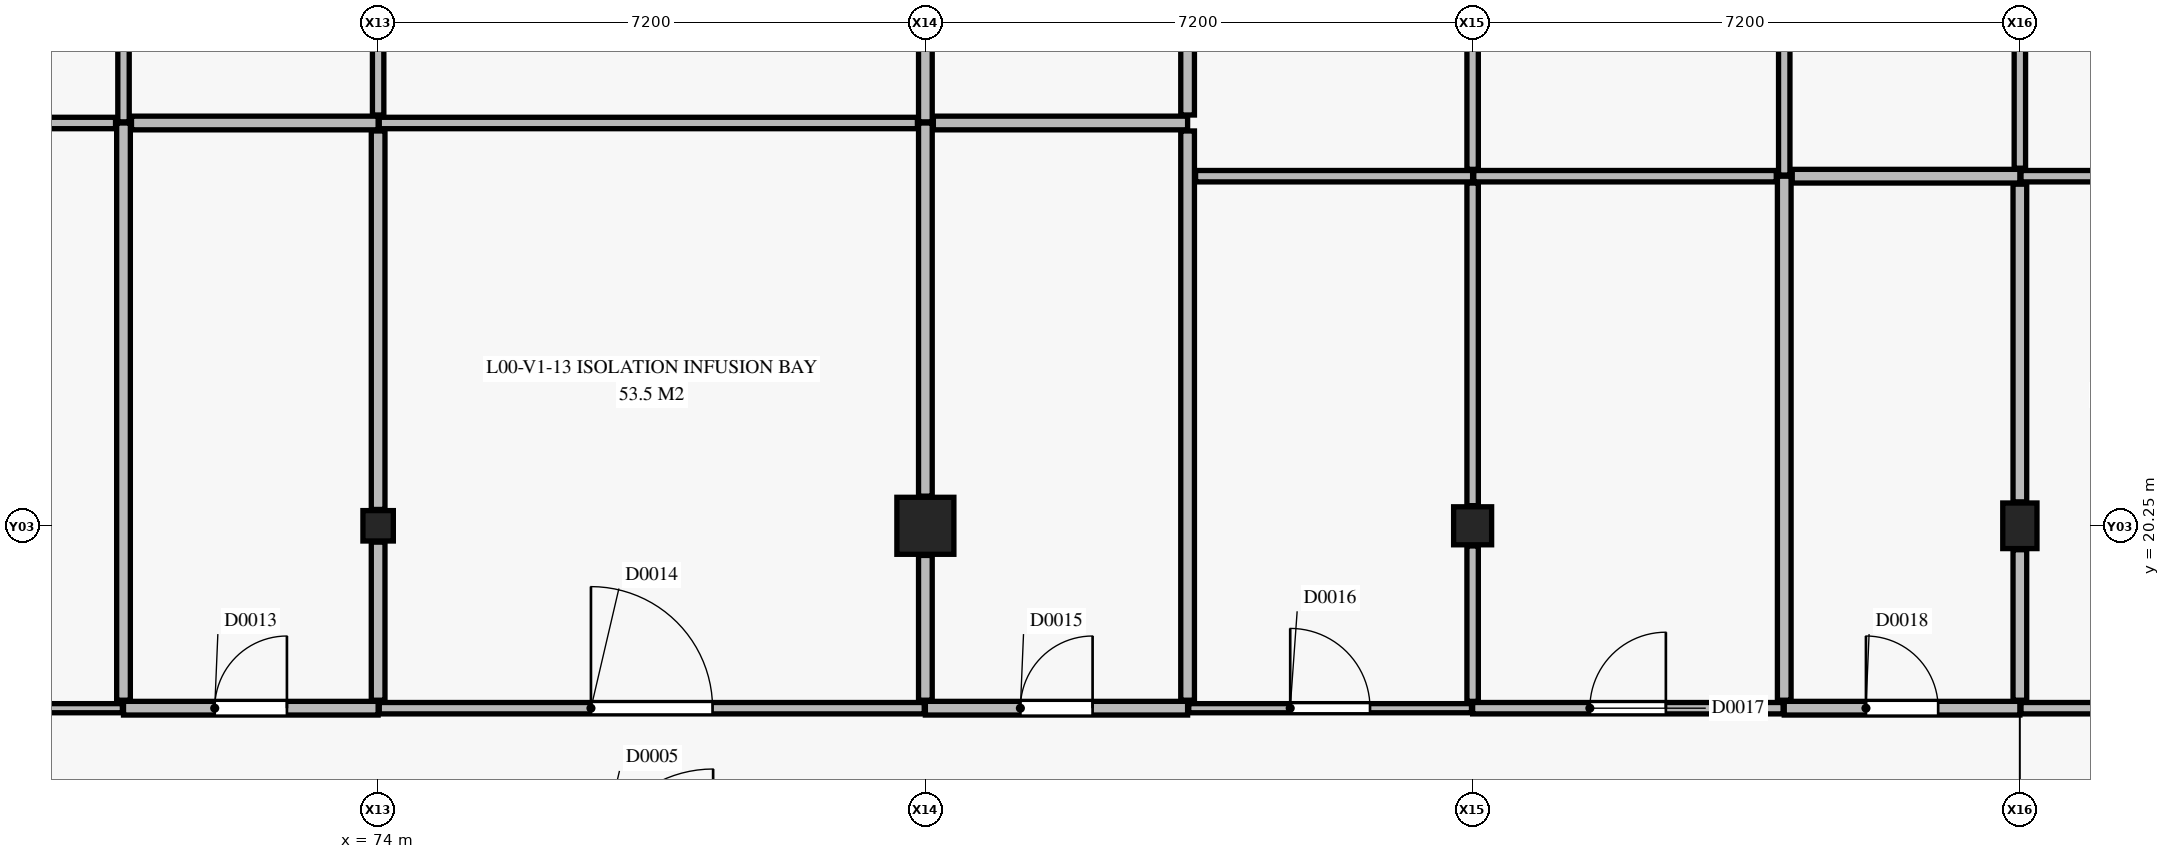
"""IFC4 building model, lengths in metres.
Left out: names, types, materials, properties, quantities, classifications, styles, units other than length and angle.
Written with IfcOpenShell. Run it as: python <this file> out.ifc"""

import sys

from ifc_helpers import new_model, si_unit, direction, frame, frame_2d, origin, origin_2d, place, context, subcontext, project, spatial, rectangle, extrude, element, fill, save


model = new_model("IFC4")
c1 = context("Model", 3, precision=1e-05, world=origin(), true_north=direction((0.0, 1.0)))
c2 = subcontext(c1, "Body", "Model", "MODEL_VIEW")
j1 = project(units=[si_unit("LENGTHUNIT", "METRE"), si_unit("PLANEANGLEUNIT", "RADIAN")], contexts=[c1])
p1 = place(None, origin())
s1 = spatial("IfcSite", under=j1, at=p1, CompositionType="ELEMENT")
p2 = place(p1, origin())
s2 = spatial("IfcBuilding", under=s1, at=p2, CompositionType="ELEMENT")
p3 = place(p2, origin())
s3 = spatial("IfcBuildingStorey", under=s2, at=p3, CompositionType="ELEMENT", Elevation=0.0)
p4 = place(p3, frame((74.0, 20.25, 0.0), z_axis=(0.0, 0.0, 1.0), x_axis=(1.0, 0.0, 0.0)))
e1 = element("IfcColumn", 1, at=p4, inside=s3, PredefinedType="COLUMN", context=c2, shape_type="SweptSolid", body=[
    extrude(rectangle(XDim=0.4, YDim=0.4, at=origin_2d()), origin(), (0.0, 0.0, 1.0), 4.8),
])
p5 = place(p3, frame((81.2, 20.25, 0.0), z_axis=(0.0, 0.0, 1.0), x_axis=(1.0, 0.0, 0.0)))
e2 = element("IfcColumn", 2, at=p5, inside=s3, PredefinedType="COLUMN", context=c2, shape_type="SweptSolid", body=[
    extrude(rectangle(XDim=0.75, YDim=0.75, at=origin_2d()), origin(), (0.0, 0.0, 1.0), 4.8),
])
p6 = place(p3, frame((88.4, 20.25, 0.0), z_axis=(0.0, 0.0, 1.0), x_axis=(1.0, 0.0, 0.0)))
e3 = element("IfcColumn", 3, at=p6, inside=s3, PredefinedType="COLUMN", context=c2, shape_type="SweptSolid", body=[
    extrude(rectangle(XDim=0.5, YDim=0.5, at=origin_2d()), origin(), (0.0, 0.0, 1.0), 4.8),
])
p7 = place(p3, frame((95.6, 20.25, 0.0), z_axis=(0.0, 0.0, 1.0), x_axis=(1.0, 0.0, 0.0)))
e4 = element("IfcColumn", 4, at=p7, inside=s3, PredefinedType="COLUMN", context=c2, shape_type="SweptSolid", body=[
    extrude(rectangle(XDim=0.45, YDim=0.6, at=origin_2d()), origin(), (0.0, 0.0, 1.0), 4.8),
])
p8 = place(p3, frame((70.65, 17.85, 0.0), z_axis=(0.0, 0.0, 1.0), x_axis=(1.0, 0.0, 0.0)))
e5 = element("IfcWall", 5, at=p8, inside=s3, PredefinedType="PLUMBINGWALL", context=c2, shape_type="SweptSolid", body=[
    extrude(rectangle(XDim=3.35, YDim=0.18, at=frame_2d((1.675, 0.0))), origin(), (0.0, 0.0, 1.0), 3.835),
])
p9 = place(p8, frame((1.2, 0.0, 0.0)))
e6 = element("IfcOpeningElement", 6, at=p9, cuts=e5, PredefinedType="OPENING", context=c2, shape_type="SweptSolid", body=[
    extrude(rectangle(XDim=0.95, YDim=2.1, at=frame_2d((0.475, 1.05))), frame((0.0, 0.1, 0.0), z_axis=(0.0, -1.0, 0.0), x_axis=(1.0, 0.0, 0.0)), (0.0, 0.0, 1.0), 0.2),
])
p10 = place(p3, frame((81.2, 17.85, 0.0), z_axis=(0.0, 0.0, 1.0), x_axis=(1.0, 0.0, 0.0)))
e7 = element("IfcWall", 7, at=p10, inside=s3, PredefinedType="PLUMBINGWALL", context=c2, shape_type="SweptSolid", body=[
    extrude(rectangle(XDim=3.45, YDim=0.18, at=frame_2d((1.725, 0.0))), origin(), (0.0, 0.0, 1.0), 3.955),
])
p11 = place(p10, frame((1.25, 0.0, 0.0)))
e8 = element("IfcOpeningElement", 8, at=p11, cuts=e7, PredefinedType="OPENING", context=c2, shape_type="SweptSolid", body=[
    extrude(rectangle(XDim=0.95, YDim=2.1, at=frame_2d((0.475, 1.05))), frame((0.0, 0.1, 0.0), z_axis=(0.0, -1.0, 0.0), x_axis=(1.0, 0.0, 0.0)), (0.0, 0.0, 1.0), 0.2),
])
p12 = place(p3, frame((92.5, 17.85, 0.0), z_axis=(0.0, 0.0, 1.0), x_axis=(1.0, 0.0, 0.0)))
e9 = element("IfcWall", 9, at=p12, inside=s3, PredefinedType="PLUMBINGWALL", context=c2, shape_type="SweptSolid", body=[
    extrude(rectangle(XDim=3.1, YDim=0.18, at=frame_2d((1.55, 0.0))), origin(), (0.0, 0.0, 1.0), 3.985),
])
p13 = place(p12, frame((1.075, 0.0, 0.0)))
e10 = element("IfcOpeningElement", 10, at=p13, cuts=e9, PredefinedType="OPENING", context=c2, shape_type="SweptSolid", body=[
    extrude(rectangle(XDim=0.95, YDim=2.1, at=frame_2d((0.475, 1.05))), frame((0.0, 0.1, 0.0), z_axis=(0.0, -1.0, 0.0), x_axis=(1.0, 0.0, 0.0)), (0.0, 0.0, 1.0), 0.2),
])
p14 = place(p3, frame((74.015, 17.85, 0.0), z_axis=(0.0, 0.0, 1.0), x_axis=(1.0, 0.0, 0.0)))
e11 = element("IfcWall", 11, at=p14, inside=s3, PredefinedType="PARTITIONING", context=c2, shape_type="SweptSolid", body=[
    extrude(rectangle(XDim=7.17, YDim=0.15, at=frame_2d((3.585, 0.0))), origin(), (0.0, 0.0, 1.0), 3.835),
])
p15 = place(p14, frame((2.785, 0.0, 0.0)))
e12 = element("IfcOpeningElement", 12, at=p15, cuts=e11, PredefinedType="OPENING", context=c2, shape_type="SweptSolid", body=[
    extrude(rectangle(XDim=1.6, YDim=2.25, at=frame_2d((0.8, 1.125))), frame((0.0, 0.085, 0.0), z_axis=(0.0, -1.0, 0.0), x_axis=(1.0, 0.0, 0.0)), (0.0, 0.0, 1.0), 0.17),
])
p16 = place(p3, frame((95.615, 17.85, 0.0), z_axis=(0.0, 0.0, 1.0), x_axis=(1.0, 0.0, 0.0)))
e13 = element("IfcWall", 13, at=p16, inside=s3, PredefinedType="PARTITIONING", context=c2, shape_type="SweptSolid", body=[
    extrude(rectangle(XDim=7.17, YDim=0.15, at=frame_2d((3.585, 0.0))), origin(), (0.0, 0.0, 1.0), 3.735),
])
p17 = place(p16, frame((2.785, 0.0, 0.0)))
e14 = element("IfcOpeningElement", 14, at=p17, cuts=e13, PredefinedType="OPENING", context=c2, shape_type="SweptSolid", body=[
    extrude(rectangle(XDim=1.6, YDim=2.25, at=frame_2d((0.8, 1.125))), frame((0.0, 0.085, 0.0), z_axis=(0.0, -1.0, 0.0), x_axis=(1.0, 0.0, 0.0)), (0.0, 0.0, 1.0), 0.17),
])
p18 = place(p3, frame((88.4, 17.85, 0.0), z_axis=(0.0, 0.0, 1.0), x_axis=(1.0, 0.0, 0.0)))
e15 = element("IfcWall", 15, at=p18, inside=s3, PredefinedType="PARTITIONING", context=c2, shape_type="SweptSolid", body=[
    extrude(rectangle(XDim=4.085, YDim=0.15, at=frame_2d((2.042, 0.0))), origin(), (0.0, 0.0, 1.0), 3.955),
])
p19 = place(p18, frame((1.542, 0.0, 0.0)))
e16 = element("IfcOpeningElement", 16, at=p19, cuts=e15, PredefinedType="OPENING", context=c2, shape_type="SweptSolid", body=[
    extrude(rectangle(XDim=1.0, YDim=2.15, at=frame_2d((0.5, 1.075))), frame((0.0, 0.085, 0.0), z_axis=(0.0, -1.0, 0.0), x_axis=(1.0, 0.0, 0.0)), (0.0, 0.0, 1.0), 0.17),
])
p20 = place(p3, frame((66.815, 17.85, 0.0), z_axis=(0.0, 0.0, 1.0), x_axis=(1.0, 0.0, 0.0)))
e17 = element("IfcWall", 17, at=p20, inside=s3, PredefinedType="PARTITIONING", context=c2, shape_type="SweptSolid", body=[
    extrude(rectangle(XDim=3.82, YDim=0.12, at=frame_2d((1.91, 0.0))), origin(), (0.0, 0.0, 1.0), 3.735),
])
p21 = place(p20, frame((1.435, 0.0, 0.0)))
e18 = element("IfcOpeningElement", 18, at=p21, cuts=e17, PredefinedType="OPENING", context=c2, shape_type="SweptSolid", body=[
    extrude(rectangle(XDim=0.95, YDim=2.1, at=frame_2d((0.475, 1.05))), frame((0.0, 0.07, 0.0), z_axis=(0.0, -1.0, 0.0), x_axis=(1.0, 0.0, 0.0)), (0.0, 0.0, 1.0), 0.14),
])
p22 = place(p3, frame((84.665, 17.85, 0.0), z_axis=(0.0, 0.0, 1.0), x_axis=(1.0, 0.0, 0.0)))
e19 = element("IfcWall", 19, at=p22, inside=s3, PredefinedType="PARTITIONING", context=c2, shape_type="SweptSolid", body=[
    extrude(rectangle(XDim=3.72, YDim=0.12, at=frame_2d((1.86, 0.0))), origin(), (0.0, 0.0, 1.0), 3.955),
])
p23 = place(p22, frame((1.335, 0.0, 0.0)))
e20 = element("IfcOpeningElement", 20, at=p23, cuts=e19, PredefinedType="OPENING", context=c2, shape_type="SweptSolid", body=[
    extrude(rectangle(XDim=1.05, YDim=2.15, at=frame_2d((0.525, 1.075))), frame((0.0, 0.07, 0.0), z_axis=(0.0, -1.0, 0.0), x_axis=(1.0, 0.0, 0.0)), (0.0, 0.0, 1.0), 0.14),
])
p24 = place(p3, frame((70.65, 17.955, 0.0), z_axis=(0.0, 0.0, 1.0), x_axis=(0.0, 1.0, 0.0)))
e21 = element("IfcWall", 21, at=p24, inside=s3, PredefinedType="PLUMBINGWALL", context=c2, shape_type="SweptSolid", body=[
    extrude(rectangle(XDim=7.595, YDim=0.18, at=frame_2d((3.797, 0.0))), origin(), (0.0, 0.0, 1.0), 3.955),
])
p25 = place(p3, frame((70.755, 25.55, 0.0), z_axis=(0.0, 0.0, 1.0), x_axis=(1.0, 0.0, 0.0)))
e22 = element("IfcWall", 22, at=p25, inside=s3, PredefinedType="PLUMBINGWALL", context=c2, shape_type="SweptSolid", body=[
    extrude(rectangle(XDim=3.245, YDim=0.18, at=frame_2d((1.623, 0.0))), origin(), (0.0, 0.0, 1.0), 4.55),
])
p26 = place(p3, frame((74.0, 17.955, 0.0), z_axis=(0.0, 0.0, 1.0), x_axis=(0.0, 1.0, 0.0)))
e23 = element("IfcWall", 23, at=p26, inside=s3, PredefinedType="PLUMBINGWALL", context=c2, shape_type="SweptSolid", body=[
    extrude(rectangle(XDim=2.08, YDim=0.18, at=frame_2d((1.04, 0.0))), origin(), (0.0, 0.0, 1.0), 3.835),
])
p27 = place(p3, frame((74.0, 20.465, 0.0), z_axis=(0.0, 0.0, 1.0), x_axis=(0.0, 1.0, 0.0)))
e24 = element("IfcWall", 24, at=p27, inside=s3, PredefinedType="PLUMBINGWALL", context=c2, shape_type="SweptSolid", body=[
    extrude(rectangle(XDim=4.98, YDim=0.18, at=frame_2d((2.49, 0.0))), origin(), (0.0, 0.0, 1.0), 4.55),
])
p28 = place(p3, frame((81.2, 17.955, 0.0), z_axis=(0.0, 0.0, 1.0), x_axis=(0.0, 1.0, 0.0)))
e25 = element("IfcWall", 25, at=p28, inside=s3, PredefinedType="PLUMBINGWALL", context=c2, shape_type="SweptSolid", body=[
    extrude(rectangle(XDim=1.905, YDim=0.18, at=frame_2d((0.953, 0.0))), origin(), (0.0, 0.0, 1.0), 3.955),
])
p29 = place(p3, frame((81.2, 20.64, 0.0), z_axis=(0.0, 0.0, 1.0), x_axis=(0.0, 1.0, 0.0)))
e26 = element("IfcWall", 26, at=p29, inside=s3, PredefinedType="PLUMBINGWALL", context=c2, shape_type="SweptSolid", body=[
    extrude(rectangle(XDim=4.91, YDim=0.18, at=frame_2d((2.455, 0.0))), origin(), (0.0, 0.0, 1.0), 4.55),
])
p30 = place(p3, frame((81.305, 25.55, 0.0), z_axis=(0.0, 0.0, 1.0), x_axis=(1.0, 0.0, 0.0)))
e27 = element("IfcWall", 27, at=p30, inside=s3, PredefinedType="PLUMBINGWALL", context=c2, shape_type="SweptSolid", body=[
    extrude(rectangle(XDim=3.345, YDim=0.18, at=frame_2d((1.672, 0.0))), origin(), (0.0, 0.0, 1.0), 4.55),
])
p31 = place(p3, frame((84.65, 17.955, 0.0), z_axis=(0.0, 0.0, 1.0), x_axis=(0.0, 1.0, 0.0)))
e28 = element("IfcWall", 28, at=p31, inside=s3, PredefinedType="PLUMBINGWALL", context=c2, shape_type="SweptSolid", body=[
    extrude(rectangle(XDim=7.49, YDim=0.18, at=frame_2d((3.745, 0.0))), origin(), (0.0, 0.0, 1.0), 3.985),
])
p32 = place(p3, frame((92.5, 17.955, 0.0), z_axis=(0.0, 0.0, 1.0), x_axis=(0.0, 1.0, 0.0)))
e29 = element("IfcWall", 29, at=p32, inside=s3, PredefinedType="PLUMBINGWALL", context=c2, shape_type="SweptSolid", body=[
    extrude(rectangle(XDim=6.895, YDim=0.18, at=frame_2d((3.448, 0.0))), origin(), (0.0, 0.0, 1.0), 3.735),
])
p33 = place(p3, frame((92.605, 24.85, 0.0), z_axis=(0.0, 0.0, 1.0), x_axis=(1.0, 0.0, 0.0)))
e30 = element("IfcWall", 30, at=p33, inside=s3, PredefinedType="PLUMBINGWALL", context=c2, shape_type="SweptSolid", body=[
    extrude(rectangle(XDim=2.995, YDim=0.18, at=frame_2d((1.498, 0.0))), origin(), (0.0, 0.0, 1.0), 4.55),
])
p34 = place(p3, frame((95.6, 17.955, 0.0), z_axis=(0.0, 0.0, 1.0), x_axis=(0.0, 1.0, 0.0)))
e31 = element("IfcWall", 31, at=p34, inside=s3, PredefinedType="PLUMBINGWALL", context=c2, shape_type="SweptSolid", body=[
    extrude(rectangle(XDim=1.98, YDim=0.18, at=frame_2d((0.99, 0.0))), origin(), (0.0, 0.0, 1.0), 3.985),
])
p35 = place(p3, frame((95.6, 20.565, 0.0), z_axis=(0.0, 0.0, 1.0), x_axis=(0.0, 1.0, 0.0)))
e32 = element("IfcWall", 32, at=p35, inside=s3, PredefinedType="PLUMBINGWALL", context=c2, shape_type="SweptSolid", body=[
    extrude(rectangle(XDim=4.18, YDim=0.18, at=frame_2d((2.09, 0.0))), origin(), (0.0, 0.0, 1.0), 4.55),
])
p36 = place(p3, frame((84.65, 25.655, 0.0), z_axis=(0.0, 0.0, 1.0), x_axis=(0.0, 1.0, 0.0)))
e33 = element("IfcWall", 33, at=p36, inside=s3, PredefinedType="PLUMBINGWALL", context=c2, shape_type="SweptSolid", body=[
    extrude(rectangle(XDim=6.79, YDim=0.18, at=frame_2d((3.395, 0.0))), origin(), (0.0, 0.0, 1.0), 4.55),
])
p37 = place(p3, frame((81.2, 25.565, 0.0), z_axis=(0.0, 0.0, 1.0), x_axis=(0.0, 1.0, 0.0)))
e34 = element("IfcWall", 34, at=p37, inside=s3, PredefinedType="PLUMBINGWALL", context=c2, shape_type="SweptSolid", body=[
    extrude(rectangle(XDim=1.52, YDim=0.18, at=frame_2d((0.76, 0.0))), origin(), (0.0, 0.0, 1.0), 4.55),
])
p38 = place(p3, frame((66.815, 25.55, 0.0), z_axis=(0.0, 0.0, 1.0), x_axis=(1.0, 0.0, 0.0)))
e35 = element("IfcWall", 35, at=p38, inside=s3, PredefinedType="PARTITIONING", context=c2, shape_type="SweptSolid", body=[
    extrude(rectangle(XDim=3.73, YDim=0.15, at=frame_2d((1.865, 0.0))), origin(), (0.0, 0.0, 1.0), 4.55),
])
p39 = place(p3, frame((74.015, 25.55, 0.0), z_axis=(0.0, 0.0, 1.0), x_axis=(1.0, 0.0, 0.0)))
e36 = element("IfcWall", 36, at=p39, inside=s3, PredefinedType="PARTITIONING", context=c2, shape_type="SweptSolid", body=[
    extrude(rectangle(XDim=7.08, YDim=0.15, at=frame_2d((3.54, 0.0))), origin(), (0.0, 0.0, 1.0), 4.55),
])
p40 = place(p3, frame((84.755, 24.85, 0.0), z_axis=(0.0, 0.0, 1.0), x_axis=(1.0, 0.0, 0.0)))
e37 = element("IfcWall", 37, at=p40, inside=s3, PredefinedType="PARTITIONING", context=c2, shape_type="SweptSolid", body=[
    extrude(rectangle(XDim=3.645, YDim=0.15, at=frame_2d((1.823, 0.0))), origin(), (0.0, 0.0, 1.0), 4.55),
])
p41 = place(p3, frame((95.615, 24.85, 0.0), z_axis=(0.0, 0.0, 1.0), x_axis=(1.0, 0.0, 0.0)))
e38 = element("IfcWall", 38, at=p41, inside=s3, PredefinedType="PARTITIONING", context=c2, shape_type="SweptSolid", body=[
    extrude(rectangle(XDim=7.08, YDim=0.15, at=frame_2d((3.54, 0.0))), origin(), (0.0, 0.0, 1.0), 3.835),
])
p42 = place(p3, frame((88.4, 24.94, 0.0), z_axis=(0.0, 0.0, 1.0), x_axis=(0.0, 1.0, 0.0)))
e39 = element("IfcWall", 39, at=p42, inside=s3, PredefinedType="PARTITIONING", context=c2, shape_type="SweptSolid", body=[
    extrude(rectangle(XDim=2.27, YDim=0.15, at=frame_2d((1.135, 0.0))), origin(), (0.0, 0.0, 1.0), 4.55),
])
p43 = place(p3, frame((70.65, 25.565, 0.0), z_axis=(0.0, 0.0, 1.0), x_axis=(0.0, 1.0, 0.0)))
e40 = element("IfcWall", 40, at=p43, inside=s3, PredefinedType="PARTITIONING", context=c2, shape_type="SweptSolid", body=[
    extrude(rectangle(XDim=6.895, YDim=0.15, at=frame_2d((3.448, 0.0))), origin(), (0.0, 0.0, 1.0), 4.55),
])
p44 = place(p3, frame((88.4, 17.94, 0.0), z_axis=(0.0, 0.0, 1.0), x_axis=(0.0, 1.0, 0.0)))
e41 = element("IfcWall", 41, at=p44, inside=s3, PredefinedType="PARTITIONING", context=c2, shape_type="SweptSolid", body=[
    extrude(rectangle(XDim=2.045, YDim=0.15, at=frame_2d((1.022, 0.0))), origin(), (0.0, 0.0, 1.0), 3.955),
])
p45 = place(p3, frame((88.4, 20.515, 0.0), z_axis=(0.0, 0.0, 1.0), x_axis=(0.0, 1.0, 0.0)))
e42 = element("IfcWall", 42, at=p45, inside=s3, PredefinedType="PARTITIONING", context=c2, shape_type="SweptSolid", body=[
    extrude(rectangle(XDim=4.245, YDim=0.15, at=frame_2d((2.123, 0.0))), origin(), (0.0, 0.0, 1.0), 4.55),
])
p46 = place(p3, frame((88.415, 24.85, 0.0), z_axis=(0.0, 0.0, 1.0), x_axis=(1.0, 0.0, 0.0)))
e43 = element("IfcWall", 43, at=p46, inside=s3, PredefinedType="PARTITIONING", context=c2, shape_type="SweptSolid", body=[
    extrude(rectangle(XDim=3.98, YDim=0.15, at=frame_2d((1.99, 0.0))), origin(), (0.0, 0.0, 1.0), 4.55),
])
p47 = place(p3, frame((92.5, 24.865, 0.0), z_axis=(0.0, 0.0, 1.0), x_axis=(0.0, 1.0, 0.0)))
e44 = element("IfcWall", 44, at=p47, inside=s3, PredefinedType="PARTITIONING", context=c2, shape_type="SweptSolid", body=[
    extrude(rectangle(XDim=7.595, YDim=0.15, at=frame_2d((3.797, 0.0))), origin(), (0.0, 0.0, 1.0), 4.55),
])
p48 = place(p3, frame((95.6, 24.955, 0.0), z_axis=(0.0, 0.0, 1.0), x_axis=(0.0, 1.0, 0.0)))
e45 = element("IfcWall", 45, at=p48, inside=s3, PredefinedType="PARTITIONING", context=c2, shape_type="SweptSolid", body=[
    extrude(rectangle(XDim=2.205, YDim=0.15, at=frame_2d((1.103, 0.0))), origin(), (0.0, 0.0, 1.0), 4.55),
])
p49 = place(p3, frame((74.0, 25.655, 0.0), z_axis=(0.0, 0.0, 1.0), x_axis=(0.0, 1.0, 0.0)))
e46 = element("IfcWall", 46, at=p49, inside=s3, PredefinedType="PARTITIONING", context=c2, shape_type="SweptSolid", body=[
    extrude(rectangle(XDim=1.43, YDim=0.15, at=frame_2d((0.715, 0.0))), origin(), (0.0, 0.0, 1.0), 4.55),
])
p50 = place(p9, origin())
e47 = element("IfcDoor", 47, at=p50, inside=s3, OperationType="SINGLE_SWING_RIGHT", PredefinedType="DOOR", context=c2, shape_type="SweptSolid", body=[
    extrude(rectangle(XDim=0.95, YDim=2.1, at=frame_2d((0.475, 1.05))), frame((0.0, 0.025, 0.0), z_axis=(0.0, -1.0, 0.0), x_axis=(1.0, 0.0, 0.0)), (0.0, 0.0, 1.0), 0.05),
])
fill(e6, e47)
p51 = place(p15, origin())
e48 = element("IfcDoor", 48, at=p51, inside=s3, OperationType="SINGLE_SWING_LEFT", PredefinedType="DOOR", context=c2, shape_type="SweptSolid", body=[
    extrude(rectangle(XDim=1.6, YDim=2.25, at=frame_2d((0.8, 1.125))), frame((0.0, 0.025, 0.0), z_axis=(0.0, -1.0, 0.0), x_axis=(1.0, 0.0, 0.0)), (0.0, 0.0, 1.0), 0.05),
])
fill(e12, e48)
p52 = place(p11, origin())
e49 = element("IfcDoor", 49, at=p52, inside=s3, OperationType="SINGLE_SWING_RIGHT", PredefinedType="DOOR", context=c2, shape_type="SweptSolid", body=[
    extrude(rectangle(XDim=0.95, YDim=2.1, at=frame_2d((0.475, 1.05))), frame((0.0, 0.025, 0.0), z_axis=(0.0, -1.0, 0.0), x_axis=(1.0, 0.0, 0.0)), (0.0, 0.0, 1.0), 0.05),
])
fill(e8, e49)
p53 = place(p23, origin())
e50 = element("IfcDoor", 50, at=p53, inside=s3, OperationType="SINGLE_SWING_LEFT", PredefinedType="DOOR", context=c2, shape_type="SweptSolid", body=[
    extrude(rectangle(XDim=1.05, YDim=2.15, at=frame_2d((0.525, 1.075))), frame((0.0, 0.025, 0.0), z_axis=(0.0, -1.0, 0.0), x_axis=(1.0, 0.0, 0.0)), (0.0, 0.0, 1.0), 0.05),
])
fill(e20, e50)
p54 = place(p19, origin())
e51 = element("IfcDoor", 51, at=p54, inside=s3, OperationType="SINGLE_SWING_RIGHT", PredefinedType="DOOR", context=c2, shape_type="SweptSolid", body=[
    extrude(rectangle(XDim=1.0, YDim=2.15, at=frame_2d((0.5, 1.075))), frame((0.0, 0.025, 0.0), z_axis=(0.0, -1.0, 0.0), x_axis=(1.0, 0.0, 0.0)), (0.0, 0.0, 1.0), 0.05),
])
fill(e16, e51)
p55 = place(p13, origin())
e52 = element("IfcDoor", 52, at=p55, inside=s3, OperationType="SINGLE_SWING_LEFT", PredefinedType="DOOR", context=c2, shape_type="SweptSolid", body=[
    extrude(rectangle(XDim=0.95, YDim=2.1, at=frame_2d((0.475, 1.05))), frame((0.0, 0.025, 0.0), z_axis=(0.0, -1.0, 0.0), x_axis=(1.0, 0.0, 0.0)), (0.0, 0.0, 1.0), 0.05),
])
fill(e10, e52)
save(model, sys.argv[1])
